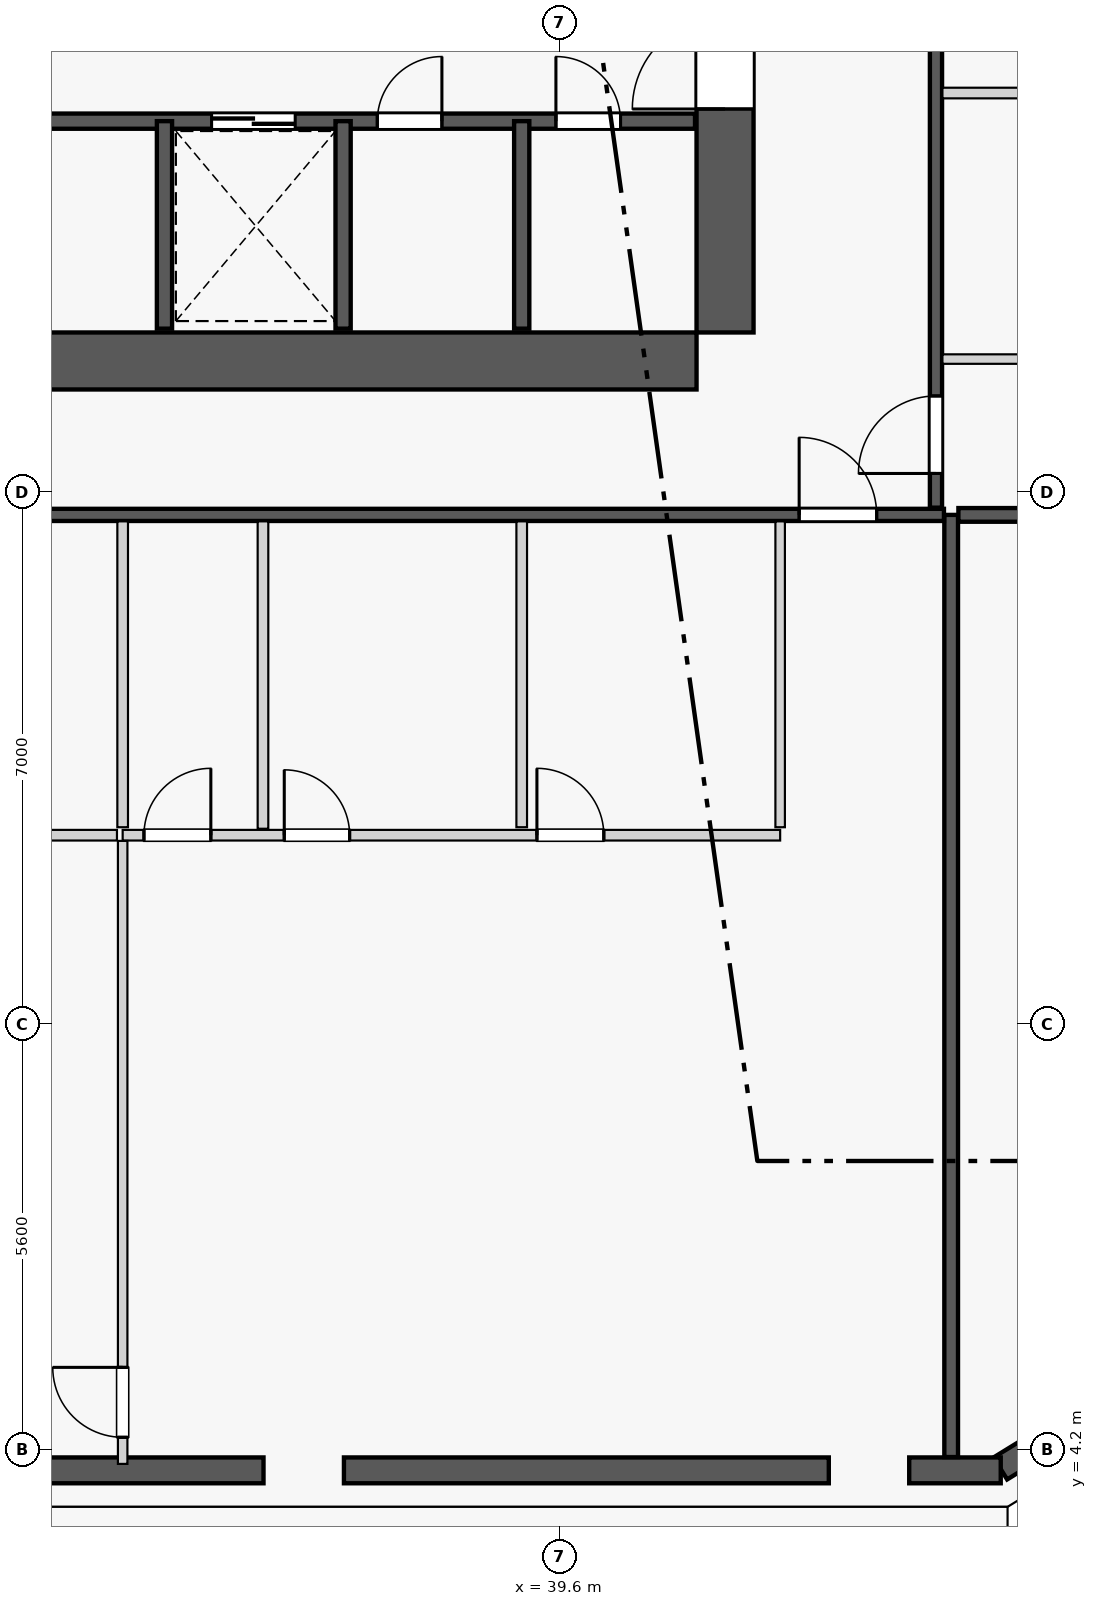
"""IFC4 building model, lengths in metres.
Left out: names, types, materials, properties, quantities, classifications, styles, units other than length and angle.
Written with IfcOpenShell. Run it as: python <this file> out.ifc"""

import sys

from ifc_helpers import new_model, si_unit, direction, frame, frame_2d, origin, origin_2d, place, context, subcontext, project, spatial, rectangle, extrude, element, fill, save


model = new_model("IFC4")
c1 = context("Model", 3, precision=1e-05, world=origin(), true_north=direction((0.0, 1.0)))
c2 = subcontext(c1, "Body", "Model", "MODEL_VIEW")
j1 = project(units=[si_unit("LENGTHUNIT", "METRE"), si_unit("PLANEANGLEUNIT", "RADIAN")], contexts=[c1])
p1 = place(None, origin())
s1 = spatial("IfcSite", under=j1, at=p1, CompositionType="ELEMENT")
p2 = place(p1, origin())
s2 = spatial("IfcBuilding", under=s1, at=p2, CompositionType="ELEMENT")
p3 = place(p2, frame((0.0, 0.0, 112.6)))
s3 = spatial("IfcBuildingStorey", under=s2, at=p3, CompositionType="ELEMENT", Elevation=112.6)
p4 = place(p3, frame((41.775, 18.525, 0.0), z_axis=(0.0, 0.0, 1.0), x_axis=(1.0, 0.0, 0.0)))
e1 = element("IfcColumn", 1, at=p4, inside=s3, PredefinedType="COLUMN", context=c2, shape_type="SweptSolid", body=[
    extrude(rectangle(XDim=0.75, YDim=0.75, at=origin_2d()), origin(), (0.0, 0.0, 1.0), 3.55),
])
p5 = place(p3, frame((23.4, 18.525, 0.0), z_axis=(0.0, 0.0, 1.0), x_axis=(1.0, 0.0, 0.0)))
e2 = element("IfcWall", 2, at=p5, inside=s3, PredefinedType="SHEAR", context=c2, shape_type="SweptSolid", body=[
    extrude(rectangle(XDim=18.0, YDim=0.75, at=frame_2d((9.0, 0.0))), origin(), (0.0, 0.0, 1.0), 3.34),
])
p6 = place(p3, frame((41.775, 18.9, 0.0), z_axis=(0.0, 0.0, 1.0), x_axis=(0.0, 1.0, 0.0)))
e3 = element("IfcWall", 3, at=p6, inside=s3, PredefinedType="SHEAR", context=c2, shape_type="SweptSolid", body=[
    extrude(rectangle(XDim=14.0, YDim=0.75, at=frame_2d((7.0, 0.0))), origin(), (0.0, 0.0, 1.0), 3.34),
])
p7 = place(p6, frame((2.94, 0.0, 0.0)))
e4 = element("IfcOpeningElement", 4, at=p7, cuts=e3, PredefinedType="OPENING", context=c2, shape_type="SweptSolid", body=[
    extrude(rectangle(XDim=1.22, YDim=2.25, at=frame_2d((0.61, 1.125))), frame((0.0, 0.385, 0.0), z_axis=(0.0, -1.0, 0.0), x_axis=(1.0, 0.0, 0.0)), (0.0, 0.0, 1.0), 0.77),
])
for number, where, z_axis, x_axis in (
    (5, (36.232, 3.992, 0.0), (0.0, 0.0, 1.0), (1.0, 0.0, 0.0)),
    (6, (43.669, 3.939, 0.0), (0.0, 0.0, 1.0), (1.0, 0.0, 0.0)),
):
    element("IfcColumn", number, at=place(p3, frame(where, z_axis=z_axis, x_axis=x_axis)), inside=s3, PredefinedType="COLUMN", context=c2, shape_type="SweptSolid", body=[
        extrude(rectangle(XDim=1.05, YDim=1.05, at=origin_2d()), origin(), (0.0, 0.0, 1.0), 3.55),
    ])
p8 = place(p3, frame((45.659, 5.093, 0.0), z_axis=(0.0, 0.0, 1.0), x_axis=(0.865160173452, 0.501495637342, 0.0)))
e7 = element("IfcColumn", 7, at=p8, inside=s3, PredefinedType="PILASTER", context=c2, shape_type="SweptSolid", body=[
    extrude(rectangle(XDim=0.5, YDim=0.35, at=origin_2d()), origin(), (0.0, 0.0, 1.0), 3.55),
])
p9 = place(p3, frame((23.42, 21.68, 0.0), z_axis=(0.0, 0.0, 1.0), x_axis=(1.0, 0.0, 0.0)))
e8 = element("IfcWall", 8, at=p9, inside=s3, PredefinedType="PLUMBINGWALL", context=c2, shape_type="SweptSolid", body=[
    extrude(rectangle(XDim=17.96, YDim=0.2, at=frame_2d((8.98, 0.0))), origin(), (0.0, 0.0, 1.0), 3.34),
])
p10 = place(p9, frame((11.6, 0.0, 0.0)))
e9 = element("IfcOpeningElement", 9, at=p10, cuts=e8, PredefinedType="OPENING", context=c2, shape_type="SweptSolid", body=[
    extrude(rectangle(XDim=1.1, YDim=2.2, at=frame_2d((0.55, 1.1))), frame((0.0, 0.11, 0.0), z_axis=(0.0, -1.0, 0.0), x_axis=(1.0, 0.0, 0.0)), (0.0, 0.0, 1.0), 0.22),
])
p11 = place(p9, frame((0.41, 0.0, 0.0)))
e10 = element("IfcOpeningElement", 10, at=p11, cuts=e8, PredefinedType="OPENING", context=c2, shape_type="SweptSolid", body=[
    extrude(rectangle(XDim=0.85, YDim=2.05, at=frame_2d((0.425, 1.025))), frame((0.0, 0.11, 0.0), z_axis=(0.0, -1.0, 0.0), x_axis=(1.0, 0.0, 0.0)), (0.0, 0.0, 1.0), 0.22),
])
p12 = place(p9, frame((13.78, 0.0, 0.0)))
e11 = element("IfcOpeningElement", 11, at=p12, cuts=e8, PredefinedType="OPENING", context=c2, shape_type="SweptSolid", body=[
    extrude(rectangle(XDim=0.85, YDim=2.05, at=frame_2d((0.425, 1.025))), frame((0.0, 0.11, 0.0), z_axis=(0.0, -1.0, 0.0), x_axis=(1.0, 0.0, 0.0)), (0.0, 0.0, 1.0), 0.22),
])
p13 = place(p9, frame((16.13, 0.0, 0.0)))
e12 = element("IfcOpeningElement", 12, at=p13, cuts=e8, PredefinedType="OPENING", context=c2, shape_type="SweptSolid", body=[
    extrude(rectangle(XDim=0.85, YDim=2.05, at=frame_2d((0.425, 1.025))), frame((0.0, 0.11, 0.0), z_axis=(0.0, -1.0, 0.0), x_axis=(1.0, 0.0, 0.0)), (0.0, 0.0, 1.0), 0.22),
])
for number, where, z_axis, x_axis in (
    (13, (34.4, 18.95, 0.0), (0.0, 0.0, 1.0), (0.0, 1.0, 0.0)),
    (14, (36.75, 18.95, 0.0), (0.0, 0.0, 1.0), (0.0, 1.0, 0.0)),
    (15, (39.1, 18.95, 0.0), (0.0, 0.0, 1.0), (0.0, 1.0, 0.0)),
):
    element("IfcWall", number, at=place(p3, frame(where, z_axis=z_axis, x_axis=x_axis)), inside=s3, PredefinedType="PLUMBINGWALL", context=c2, shape_type="SweptSolid", body=[
        extrude(rectangle(XDim=2.73, YDim=0.2, at=frame_2d((1.365, 0.0))), origin(), (0.0, 0.0, 1.0), 3.34),
    ])
p14 = place(p3, frame((45.397, 3.955, 0.0), z_axis=(0.0, 0.0, 1.0), x_axis=(0.851798915137, 0.523868884523, 0.0)))
e16 = element("IfcWall", 16, at=p14, inside=s3, PredefinedType="STANDARD", context=c2, shape_type="SweptSolid", body=[
    extrude(rectangle(XDim=1.848, YDim=0.34, at=frame_2d((0.924, 0.0))), origin(), (0.0, 0.0, 1.0), 3.34),
])
p15 = place(p3, frame((29.097, 3.93, 0.0), z_axis=(0.0, 0.0, 1.0), x_axis=(1.0, 0.0, 0.0)))
e17 = element("IfcWall", 17, at=p15, inside=s3, PredefinedType="STANDARD", context=c2, shape_type="SweptSolid", body=[
    extrude(rectangle(XDim=6.606, YDim=0.34, at=frame_2d((3.303, 0.0))), origin(), (0.0, 0.0, 1.0), 2.797),
])
p16 = place(p15, frame((1.775, 0.0, 0.0)))
e18 = element("IfcOpeningElement", 18, at=p16, cuts=e17, PredefinedType="OPENING", context=c2, shape_type="SweptSolid", body=[
    extrude(rectangle(XDim=1.1, YDim=2.25, at=frame_2d((0.55, 1.125))), frame((0.0, 0.18, 0.0), z_axis=(0.0, -1.0, 0.0), x_axis=(1.0, 0.0, 0.0)), (0.0, 0.0, 1.0), 0.36),
])
p17 = place(p15, frame((5.186, 0.0, 0.75)))
e19 = element("IfcOpeningElement", 19, at=p17, cuts=e17, PredefinedType="OPENING", context=c2, shape_type="SweptSolid", body=[
    extrude(rectangle(XDim=1.1, YDim=1.897, at=frame_2d((0.55, 0.948))), frame((0.0, 0.18, 0.0), z_axis=(0.0, -1.0, 0.0), x_axis=(1.0, 0.0, 0.0)), (0.0, 0.0, 1.0), 0.36),
])
p18 = place(p3, frame((36.761, 3.93, 0.0), z_axis=(0.0, 0.0, 1.0), x_axis=(1.0, 0.0, 0.0)))
e20 = element("IfcWall", 20, at=p18, inside=s3, PredefinedType="STANDARD", context=c2, shape_type="SweptSolid", body=[
    extrude(rectangle(XDim=6.379, YDim=0.34, at=frame_2d((3.189, 0.0))), origin(), (0.0, 0.0, 1.0), 2.797),
])
p19 = place(p18, frame((2.639, 0.0, 0.75)))
e21 = element("IfcOpeningElement", 21, at=p19, cuts=e20, PredefinedType="OPENING", context=c2, shape_type="SweptSolid", body=[
    extrude(rectangle(XDim=1.1, YDim=1.897, at=frame_2d((0.55, 0.948))), frame((0.0, 0.18, 0.0), z_axis=(0.0, -1.0, 0.0), x_axis=(1.0, 0.0, 0.0)), (0.0, 0.0, 1.0), 0.36),
])
p20 = place(p3, frame((44.198, 3.93, 0.0), z_axis=(0.0, 0.0, 1.0), x_axis=(1.0, 0.0, 0.0)))
e22 = element("IfcWall", 22, at=p20, inside=s3, PredefinedType="STANDARD", context=c2, shape_type="SweptSolid", body=[
    extrude(rectangle(XDim=1.204, YDim=0.34, at=frame_2d((0.602, 0.0))), origin(), (0.0, 0.0, 1.0), 3.34),
])
p21 = place(p3, frame((44.75, 4.105, 0.0), z_axis=(0.0, 0.0, 1.0), x_axis=(0.0, 1.0, 0.0)))
e23 = element("IfcWall", 23, at=p21, inside=s3, PredefinedType="PARTITIONING", context=c2, shape_type="SweptSolid", body=[
    extrude(rectangle(XDim=12.395, YDim=0.18, at=frame_2d((6.198, 0.0))), origin(), (0.0, 0.0, 1.0), 3.34),
])
p22 = place(p3, frame((28.663, 16.5, 0.0), z_axis=(0.0, 0.0, 1.0), x_axis=(1.0, 0.0, 0.0)))
e24 = element("IfcWall", 24, at=p22, inside=s3, PredefinedType="PARTITIONING", context=c2, shape_type="SweptSolid", body=[
    extrude(rectangle(XDim=15.992, YDim=0.16, at=frame_2d((7.996, 0.0))), origin(), (0.0, 0.0, 1.0), 3.34),
])
p23 = place(p22, frame((14.087, 0.0, 0.0)))
e25 = element("IfcOpeningElement", 25, at=p23, cuts=e24, PredefinedType="OPENING", context=c2, shape_type="SweptSolid", body=[
    extrude(rectangle(XDim=1.02, YDim=2.25, at=frame_2d((0.51, 1.125))), frame((0.0, 0.09, 0.0), z_axis=(0.0, -1.0, 0.0), x_axis=(1.0, 0.0, 0.0)), (0.0, 0.0, 1.0), 0.18),
])
p24 = place(p3, frame((42.5, 12.391, 0.0), z_axis=(0.0, 0.0, 1.0), x_axis=(0.0, 1.0, 0.0)))
e26 = element("IfcWall", 26, at=p24, inside=s3, PredefinedType="PARTITIONING", context=c2, shape_type="SweptSolid", body=[
    extrude(rectangle(XDim=4.024, YDim=0.125, at=frame_2d((2.012, 0.0))), origin(), (0.0, 0.0, 1.0), 2.722),
])
p25 = place(p3, frame((33.85, 12.286, 0.0), z_axis=(0.0, 0.0, 1.0), x_axis=(1.0, 0.0, 0.0)))
e27 = element("IfcWall", 27, at=p25, inside=s3, PredefinedType="PLUMBINGWALL", context=c2, shape_type="SweptSolid", body=[
    extrude(rectangle(XDim=8.65, YDim=0.14, at=frame_2d((4.325, 0.0))), origin(), (0.0, 0.0, 1.0), 3.34),
])
p26 = place(p25, frame((0.28, 0.0, 0.0)))
e28 = element("IfcOpeningElement", 28, at=p26, cuts=e27, PredefinedType="OPENING", context=c2, shape_type="SweptSolid", body=[
    extrude(rectangle(XDim=0.88, YDim=2.15, at=frame_2d((0.44, 1.075))), frame((0.0, 0.08, 0.0), z_axis=(0.0, -1.0, 0.0), x_axis=(1.0, 0.0, 0.0)), (0.0, 0.0, 1.0), 0.16),
])
p27 = place(p25, frame((2.126, 0.0, 0.0)))
e29 = element("IfcOpeningElement", 29, at=p27, cuts=e27, PredefinedType="OPENING", context=c2, shape_type="SweptSolid", body=[
    extrude(rectangle(XDim=0.86, YDim=2.1, at=frame_2d((0.43, 1.05))), frame((0.0, 0.08, 0.0), z_axis=(0.0, -1.0, 0.0), x_axis=(1.0, 0.0, 0.0)), (0.0, 0.0, 1.0), 0.16),
])
p28 = place(p25, frame((5.45, 0.0, 0.0)))
e30 = element("IfcOpeningElement", 30, at=p28, cuts=e27, PredefinedType="OPENING", context=c2, shape_type="SweptSolid", body=[
    extrude(rectangle(XDim=0.88, YDim=2.15, at=frame_2d((0.44, 1.075))), frame((0.0, 0.08, 0.0), z_axis=(0.0, -1.0, 0.0), x_axis=(1.0, 0.0, 0.0)), (0.0, 0.0, 1.0), 0.16),
])
p29 = place(p3, frame((28.663, 12.286, 0.0), z_axis=(0.0, 0.0, 1.0), x_axis=(1.0, 0.0, 0.0)))
e31 = element("IfcWall", 31, at=p29, inside=s3, PredefinedType="PLUMBINGWALL", context=c2, shape_type="SweptSolid", body=[
    extrude(rectangle(XDim=5.112, YDim=0.14, at=frame_2d((2.556, 0.0))), origin(), (0.0, 0.0, 1.0), 3.34),
])
p30 = place(p29, frame((0.28, 0.0, 0.0)))
e32 = element("IfcOpeningElement", 32, at=p30, cuts=e31, PredefinedType="OPENING", context=c2, shape_type="SweptSolid", body=[
    extrude(rectangle(XDim=0.88, YDim=2.15, at=frame_2d((0.44, 1.075))), frame((0.0, 0.08, 0.0), z_axis=(0.0, -1.0, 0.0), x_axis=(1.0, 0.0, 0.0)), (0.0, 0.0, 1.0), 0.16),
])
p31 = place(p29, frame((1.988, 0.0, 0.0)))
e33 = element("IfcOpeningElement", 33, at=p31, cuts=e31, PredefinedType="OPENING", context=c2, shape_type="SweptSolid", body=[
    extrude(rectangle(XDim=0.86, YDim=2.1, at=frame_2d((0.43, 1.05))), frame((0.0, 0.08, 0.0), z_axis=(0.0, -1.0, 0.0), x_axis=(1.0, 0.0, 0.0)), (0.0, 0.0, 1.0), 0.16),
])
for number, where, z_axis, x_axis in (
    (34, (39.1, 12.391, 0.0), (0.0, 0.0, 1.0), (0.0, 1.0, 0.0)),
    (35, (33.85, 12.391, 0.0), (0.0, 0.0, 1.0), (0.0, 1.0, 0.0)),
):
    element("IfcWall", number, at=place(p3, frame(where, z_axis=z_axis, x_axis=x_axis)), inside=s3, PredefinedType="PLUMBINGWALL", context=c2, shape_type="SweptSolid", body=[
        extrude(rectangle(XDim=4.024, YDim=0.14, at=frame_2d((2.012, 0.0))), origin(), (0.0, 0.0, 1.0), 3.34),
    ])
p32 = place(p3, frame((33.85, 4.015, 0.0), z_axis=(0.0, 0.0, 1.0), x_axis=(0.0, 1.0, 0.0)))
e36 = element("IfcWall", 36, at=p32, inside=s3, PredefinedType="PARTITIONING", context=c2, shape_type="SweptSolid", body=[
    extrude(rectangle(XDim=8.196, YDim=0.125, at=frame_2d((4.098, 0.0))), origin(), (0.0, 0.0, 1.0), 3.34),
])
p33 = place(p32, frame((0.35, 0.0, 0.0)))
e37 = element("IfcOpeningElement", 37, at=p33, cuts=e36, PredefinedType="OPENING", context=c2, shape_type="SweptSolid", body=[
    extrude(rectangle(XDim=0.92, YDim=2.15, at=frame_2d((0.46, 1.075))), frame((0.0, 0.073, 0.0), z_axis=(0.0, -1.0, 0.0), x_axis=(1.0, 0.0, 0.0)), (0.0, 0.0, 1.0), 0.145),
])
p34 = place(p3, frame((35.696, 12.371, 0.0), z_axis=(0.0, 0.0, 1.0), x_axis=(0.0, 1.0, 0.0)))
e38 = element("IfcWall", 38, at=p34, inside=s3, PredefinedType="PLUMBINGWALL", context=c2, shape_type="SweptSolid", body=[
    extrude(rectangle(XDim=4.044, YDim=0.14, at=frame_2d((2.022, 0.0))), origin(), (0.0, 0.0, 1.0), 3.34),
])
p35 = place(p3, frame((44.845, 16.5, 0.0), z_axis=(0.0, 0.0, 1.0), x_axis=(1.0, 0.0, 0.0)))
e39 = element("IfcWall", 39, at=p35, inside=s3, PredefinedType="PARTITIONING", context=c2, shape_type="SweptSolid", body=[
    extrude(rectangle(XDim=7.77, YDim=0.18, at=frame_2d((3.885, 0.0))), origin(), (0.0, 0.0, 1.0), 3.34),
])
p36 = place(p3, frame((44.55, 16.595, 0.0), z_axis=(0.0, 0.0, 1.0), x_axis=(0.0, 1.0, 0.0)))
e40 = element("IfcWall", 40, at=p36, inside=s3, PredefinedType="PARTITIONING", context=c2, shape_type="SweptSolid", body=[
    extrude(rectangle(XDim=18.61, YDim=0.16, at=frame_2d((9.305, 0.0))), origin(), (0.0, 0.0, 1.0), 3.34),
])
p37 = place(p36, frame((0.45, 0.0, 0.0)))
e41 = element("IfcOpeningElement", 41, at=p37, cuts=e40, PredefinedType="OPENING", context=c2, shape_type="SweptSolid", body=[
    extrude(rectangle(XDim=1.02, YDim=2.25, at=frame_2d((0.51, 1.125))), frame((0.0, 0.09, 0.0), z_axis=(0.0, -1.0, 0.0), x_axis=(1.0, 0.0, 0.0)), (0.0, 0.0, 1.0), 0.18),
])
p38 = place(p3, frame((44.635, 18.55, 0.0), z_axis=(0.0, 0.0, 1.0), x_axis=(1.0, 0.0, 0.0)))
e42 = element("IfcWall", 42, at=p38, inside=s3, PredefinedType="PARTITIONING", context=c2, shape_type="SweptSolid", body=[
    extrude(rectangle(XDim=3.88, YDim=0.125, at=frame_2d((1.94, 0.0))), origin(), (0.0, 0.0, 1.0), 2.722),
])
p39 = place(p3, frame((44.635, 22.05, 0.0), z_axis=(0.0, 0.0, 1.0), x_axis=(1.0, 0.0, 0.0)))
e43 = element("IfcWall", 43, at=p39, inside=s3, PredefinedType="PLUMBINGWALL", context=c2, shape_type="SweptSolid", body=[
    extrude(rectangle(XDim=3.88, YDim=0.14, at=frame_2d((1.94, 0.0))), origin(), (0.0, 0.0, 1.0), 3.34),
])
p40 = place(p7, origin())
e44 = element("IfcDoor", 44, at=p40, inside=s3, OperationType="SINGLE_SWING_LEFT", PredefinedType="DOOR", context=c2, shape_type="SweptSolid", body=[
    extrude(rectangle(XDim=1.22, YDim=2.25, at=frame_2d((0.61, 1.125))), frame((0.0, 0.025, 0.0), z_axis=(0.0, -1.0, 0.0), x_axis=(1.0, 0.0, 0.0)), (0.0, 0.0, 1.0), 0.05),
])
fill(e4, e44)
p41 = place(p10, origin())
e45 = element("IfcDoor", 45, at=p41, inside=s3, OperationType="DOUBLE_DOOR_SLIDING", PredefinedType="DOOR", context=c2, shape_type="SweptSolid", body=[
    extrude(rectangle(XDim=1.1, YDim=2.2, at=frame_2d((0.55, 1.1))), frame((0.0, 0.025, 0.0), z_axis=(0.0, -1.0, 0.0), x_axis=(1.0, 0.0, 0.0)), (0.0, 0.0, 1.0), 0.05),
])
fill(e9, e45)
p42 = place(p12, origin())
e46 = element("IfcDoor", 46, at=p42, inside=s3, OperationType="SINGLE_SWING_RIGHT", PredefinedType="DOOR", context=c2, shape_type="SweptSolid", body=[
    extrude(rectangle(XDim=0.85, YDim=2.05, at=frame_2d((0.425, 1.025))), frame((0.0, 0.025, 0.0), z_axis=(0.0, -1.0, 0.0), x_axis=(1.0, 0.0, 0.0)), (0.0, 0.0, 1.0), 0.05),
])
fill(e11, e46)
p43 = place(p13, origin())
e47 = element("IfcDoor", 47, at=p43, inside=s3, OperationType="SINGLE_SWING_LEFT", PredefinedType="DOOR", context=c2, shape_type="SweptSolid", body=[
    extrude(rectangle(XDim=0.85, YDim=2.05, at=frame_2d((0.425, 1.025))), frame((0.0, 0.025, 0.0), z_axis=(0.0, -1.0, 0.0), x_axis=(1.0, 0.0, 0.0)), (0.0, 0.0, 1.0), 0.05),
])
fill(e12, e47)
p44 = place(p19, origin())
e48 = element("IfcWindow", 48, at=p44, inside=s3, PartitioningType="SINGLE_PANEL", PredefinedType="WINDOW", context=c2, shape_type="SweptSolid", body=[
    extrude(rectangle(XDim=1.1, YDim=1.897, at=frame_2d((0.55, 0.948))), frame((0.0, 0.03, 0.0), z_axis=(0.0, -1.0, 0.0), x_axis=(1.0, 0.0, 0.0)), (0.0, 0.0, 1.0), 0.06),
])
fill(e21, e48)
p45 = place(p26, origin())
e49 = element("IfcDoor", 49, at=p45, inside=s3, OperationType="SINGLE_SWING_RIGHT", PredefinedType="DOOR", context=c2, shape_type="SweptSolid", body=[
    extrude(rectangle(XDim=0.88, YDim=2.15, at=frame_2d((0.44, 1.075))), frame((0.0, 0.025, 0.0), z_axis=(0.0, -1.0, 0.0), x_axis=(1.0, 0.0, 0.0)), (0.0, 0.0, 1.0), 0.05),
])
fill(e28, e49)
p46 = place(p27, origin())
e50 = element("IfcDoor", 50, at=p46, inside=s3, OperationType="SINGLE_SWING_LEFT", PredefinedType="DOOR", context=c2, shape_type="SweptSolid", body=[
    extrude(rectangle(XDim=0.86, YDim=2.1, at=frame_2d((0.43, 1.05))), frame((0.0, 0.025, 0.0), z_axis=(0.0, -1.0, 0.0), x_axis=(1.0, 0.0, 0.0)), (0.0, 0.0, 1.0), 0.05),
])
fill(e29, e50)
p47 = place(p23, origin())
e51 = element("IfcDoor", 51, at=p47, inside=s3, OperationType="SINGLE_SWING_LEFT", PredefinedType="DOOR", context=c2, shape_type="SweptSolid", body=[
    extrude(rectangle(XDim=1.02, YDim=2.25, at=frame_2d((0.51, 1.125))), frame((0.0, 0.025, 0.0), z_axis=(0.0, -1.0, 0.0), x_axis=(1.0, 0.0, 0.0)), (0.0, 0.0, 1.0), 0.05),
])
fill(e25, e51)
p48 = place(p28, origin())
e52 = element("IfcDoor", 52, at=p48, inside=s3, OperationType="SINGLE_SWING_LEFT", PredefinedType="DOOR", context=c2, shape_type="SweptSolid", body=[
    extrude(rectangle(XDim=0.88, YDim=2.15, at=frame_2d((0.44, 1.075))), frame((0.0, 0.025, 0.0), z_axis=(0.0, -1.0, 0.0), x_axis=(1.0, 0.0, 0.0)), (0.0, 0.0, 1.0), 0.05),
])
fill(e30, e52)
p49 = place(p33, origin())
e53 = element("IfcDoor", 53, at=p49, inside=s3, OperationType="SINGLE_SWING_RIGHT", PredefinedType="DOOR", context=c2, shape_type="SweptSolid", body=[
    extrude(rectangle(XDim=0.92, YDim=2.15, at=frame_2d((0.46, 1.075))), frame((0.0, 0.025, 0.0), z_axis=(0.0, -1.0, 0.0), x_axis=(1.0, 0.0, 0.0)), (0.0, 0.0, 1.0), 0.05),
])
fill(e37, e53)
p50 = place(p37, origin())
e54 = element("IfcDoor", 54, at=p50, inside=s3, OperationType="SINGLE_SWING_LEFT", PredefinedType="DOOR", context=c2, shape_type="SweptSolid", body=[
    extrude(rectangle(XDim=1.02, YDim=2.25, at=frame_2d((0.51, 1.125))), frame((0.0, 0.025, 0.0), z_axis=(0.0, -1.0, 0.0), x_axis=(1.0, 0.0, 0.0)), (0.0, 0.0, 1.0), 0.05),
])
fill(e41, e54)
p51 = place(p17, origin())
e55 = element("IfcWindow", 55, at=p51, inside=s3, PartitioningType="SINGLE_PANEL", PredefinedType="WINDOW", context=c2, shape_type="SweptSolid", body=[
    extrude(rectangle(XDim=1.1, YDim=1.897, at=frame_2d((0.55, 0.948))), frame((0.0, 0.03, 0.0), z_axis=(0.0, -1.0, 0.0), x_axis=(1.0, 0.0, 0.0)), (0.0, 0.0, 1.0), 0.06),
])
fill(e19, e55)
save(model, sys.argv[1])
